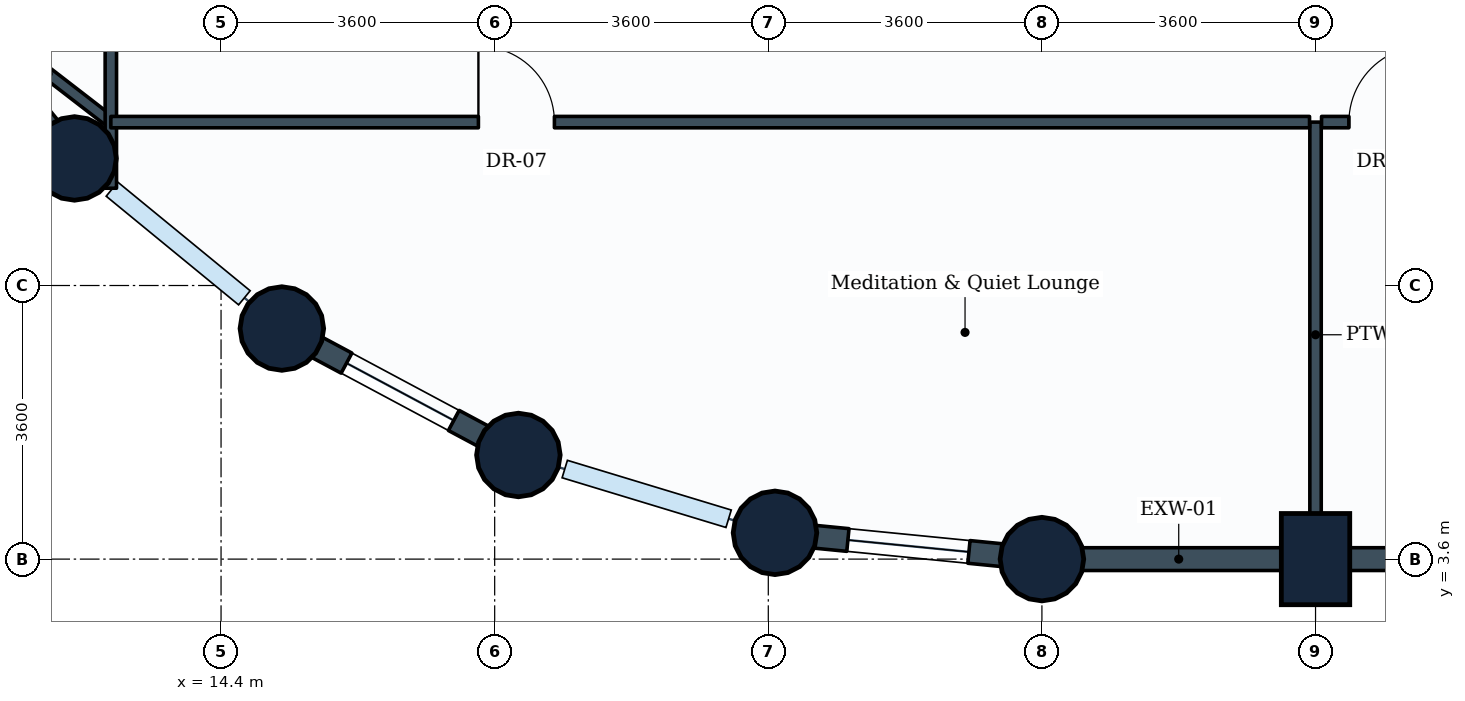
"""IFC4 building model, lengths in metres.
Left out: names, types, materials, properties, quantities, classifications, styles, units other than length and angle.
Written with IfcOpenShell. Run it as: python <this file> out.ifc"""

import sys

from ifc_helpers import new_model, si_unit, direction, frame, frame_2d, origin, origin_2d, place, context, subcontext, project, spatial, rectangle, circle, extrude, element, fill, save


model = new_model("IFC4")
c1 = context("Model", 3, precision=1e-05, world=origin(), true_north=direction((0.0, 1.0)))
c2 = subcontext(c1, "Body", "Model", "MODEL_VIEW")
j1 = project(units=[si_unit("LENGTHUNIT", "METRE"), si_unit("PLANEANGLEUNIT", "RADIAN")], contexts=[c1])
p1 = place(None, origin())
s1 = spatial("IfcSite", under=j1, at=p1, CompositionType="ELEMENT")
p2 = place(p1, origin())
s2 = spatial("IfcBuilding", under=s1, at=p2, CompositionType="ELEMENT")
p3 = place(p2, frame((0.0, 0.0, 51.3)))
s3 = spatial("IfcBuildingStorey", under=s2, at=p3, CompositionType="ELEMENT", Elevation=51.3)
for number, where, z_axis, x_axis in (
    (1, (12.472, 8.872, 0.0), (0.0, 0.0, 1.0), (1.0, 0.0, 0.0)),
    (2, (15.2, 6.634, 0.0), (0.0, 0.0, 1.0), (1.0, 0.0, 0.0)),
    (3, (18.312, 4.97, 0.0), (0.0, 0.0, 1.0), (1.0, 0.0, 0.0)),
    (4, (21.688, 3.946, 0.0), (0.0, 0.0, 1.0), (1.0, 0.0, 0.0)),
    (5, (25.2, 3.6, 0.0), (0.0, 0.0, 1.0), (1.0, 0.0, 0.0)),
):
    element("IfcColumn", number, at=place(p3, frame(where, z_axis=z_axis, x_axis=x_axis)), inside=s3, PredefinedType="COLUMN", context=c2, shape_type="SweptSolid", body=[
        extrude(circle(Radius=0.55, at=origin_2d()), origin(), (0.0, 0.0, 1.0), 3.9),
    ])
p4 = place(p3, frame((28.8, 3.6, 0.0), z_axis=(0.0, 0.0, 1.0), x_axis=(1.0, 0.0, 0.0)))
e6 = element("IfcColumn", 6, at=p4, inside=s3, PredefinedType="COLUMN", context=c2, shape_type="SweptSolid", body=[
    extrude(rectangle(XDim=0.9, YDim=1.2, at=origin_2d()), origin(), (0.0, 0.0, 1.0), 3.9),
])
p5 = place(p3, frame((28.8, 3.6, 0.0), z_axis=(0.0, 0.0, 1.0), x_axis=(-1.0, 0.0, 0.0)))
e7 = element("IfcWall", 7, at=p5, inside=s3, PredefinedType="STANDARD", context=c2, shape_type="SweptSolid", body=[
    extrude(rectangle(XDim=3.6, YDim=0.3, at=frame_2d((1.8, 0.0))), origin(), (0.0, 0.0, 1.0), 2.93),
])
p6 = place(p3, frame((32.4, 3.6, 0.0), z_axis=(0.0, 0.0, 1.0), x_axis=(-1.0, 0.0, 0.0)))
e8 = element("IfcWall", 8, at=p6, inside=s3, PredefinedType="STANDARD", context=c2, shape_type="SweptSolid", body=[
    extrude(rectangle(XDim=3.6, YDim=0.3, at=frame_2d((1.8, 0.0))), origin(), (0.0, 0.0, 1.0), 2.93),
])
p7 = place(p3, frame((12.472, 8.872, 0.0), z_axis=(0.0, 0.0, 1.0), x_axis=(-0.634258295121, 0.773121216285, 0.0)))
e9 = element("IfcWall", 9, at=p7, inside=s3, PredefinedType="STANDARD", context=c2, shape_type="SweptSolid", body=[
    extrude(rectangle(XDim=3.529, YDim=0.3, at=frame_2d((1.764, 0.0))), origin(), (0.0, 0.0, 1.0), 2.93),
])
p8 = place(p3, frame((18.312, 4.97, 0.0), z_axis=(0.0, 0.0, 1.0), x_axis=(-0.881846862014, 0.471535907389, 0.0)))
e10 = element("IfcWall", 10, at=p8, inside=s3, PredefinedType="STANDARD", context=c2, shape_type="SweptSolid", body=[
    extrude(rectangle(XDim=3.529, YDim=0.3, at=frame_2d((1.765, 0.0))), origin(), (0.0, 0.0, 1.0), 2.93),
])
p9 = place(p8, frame((0.964, 0.0, 0.85)))
e11 = element("IfcOpeningElement", 11, at=p9, cuts=e10, PredefinedType="OPENING", context=c2, shape_type="SweptSolid", body=[
    extrude(rectangle(XDim=1.6, YDim=1.35, at=frame_2d((0.8, 0.675))), frame((0.0, 0.16, 0.0), z_axis=(0.0, -1.0, 0.0), x_axis=(1.0, 0.0, 0.0)), (0.0, 0.0, 1.0), 0.32),
])
p10 = place(p3, frame((25.2, 3.6, 0.0), z_axis=(0.0, 0.0, 1.0), x_axis=(-0.995183369056, 0.098030923459, 0.0)))
e12 = element("IfcWall", 12, at=p10, inside=s3, PredefinedType="STANDARD", context=c2, shape_type="SweptSolid", body=[
    extrude(rectangle(XDim=3.529, YDim=0.3, at=frame_2d((1.765, 0.0))), origin(), (0.0, 0.0, 1.0), 2.93),
])
p11 = place(p10, frame((0.965, 0.0, 0.85)))
e13 = element("IfcOpeningElement", 13, at=p11, cuts=e12, PredefinedType="OPENING", context=c2, shape_type="SweptSolid", body=[
    extrude(rectangle(XDim=1.6, YDim=1.35, at=frame_2d((0.8, 0.675))), frame((0.0, 0.16, 0.0), z_axis=(0.0, -1.0, 0.0), x_axis=(1.0, 0.0, 0.0)), (0.0, 0.0, 1.0), 0.32),
])
p12 = place(p3, frame((28.8, 9.35, 0.0), z_axis=(0.0, 0.0, 1.0), x_axis=(0.0, -1.0, 0.0)))
e14 = element("IfcWall", 14, at=p12, inside=s3, PredefinedType="PARTITIONING", context=c2, shape_type="SweptSolid", body=[
    extrude(rectangle(XDim=5.596, YDim=0.15, at=frame_2d((2.798, 0.0))), origin(), (0.0, 0.0, 1.0), 3.635),
])
p13 = place(p3, frame((12.95, 9.35, 0.0), z_axis=(0.0, 0.0, 1.0), x_axis=(-0.791573423038, 0.611074067474, 0.0)))
e15 = element("IfcWall", 15, at=p13, inside=s3, PredefinedType="PARTITIONING", context=c2, shape_type="SweptSolid", body=[
    extrude(rectangle(XDim=2.084, YDim=0.15, at=frame_2d((1.042, 0.0))), origin(), (0.0, 0.0, 1.0), 2.93),
])
p14 = place(p3, frame((12.95, 8.48, 0.0), z_axis=(0.0, 0.0, 1.0), x_axis=(0.0, 1.0, 0.0)))
e16 = element("IfcWall", 16, at=p14, inside=s3, PredefinedType="PARTITIONING", context=c2, shape_type="SweptSolid", body=[
    extrude(rectangle(XDim=8.041, YDim=0.15, at=frame_2d((4.021, 0.0))), origin(), (0.0, 0.0, 1.0), 2.93),
])
p15 = place(p14, frame((5.101, 0.0, 0.0)))
e17 = element("IfcOpeningElement", 17, at=p15, cuts=e16, PredefinedType="OPENING", context=c2, shape_type="SweptSolid", body=[
    extrude(rectangle(XDim=1.0, YDim=2.1, at=frame_2d((0.5, 1.05))), frame((0.0, 0.085, 0.0), z_axis=(0.0, -1.0, 0.0), x_axis=(1.0, 0.0, 0.0)), (0.0, 0.0, 1.0), 0.17),
])
p16 = place(p3, frame((12.95, 9.35, 0.0), z_axis=(0.0, 0.0, 1.0), x_axis=(1.0, 0.0, 0.0)))
e18 = element("IfcWall", 18, at=p16, inside=s3, PredefinedType="PARTITIONING", context=c2, shape_type="SweptSolid", body=[
    extrude(rectangle(XDim=15.771, YDim=0.15, at=frame_2d((7.885, 0.0))), origin(), (0.0, 0.0, 1.0), 3.04),
])
p17 = place(p16, frame((4.836, 0.0, 0.0)))
e19 = element("IfcOpeningElement", 19, at=p17, cuts=e18, PredefinedType="OPENING", context=c2, shape_type="SweptSolid", body=[
    extrude(rectangle(XDim=1.0, YDim=2.1, at=frame_2d((0.5, 1.05))), frame((0.0, 0.085, 0.0), z_axis=(0.0, -1.0, 0.0), x_axis=(1.0, 0.0, 0.0)), (0.0, 0.0, 1.0), 0.17),
])
p18 = place(p3, frame((28.879, 9.35, 0.0), z_axis=(0.0, 0.0, 1.0), x_axis=(1.0, 0.0, 0.0)))
e20 = element("IfcWall", 20, at=p18, inside=s3, PredefinedType="PARTITIONING", context=c2, shape_type="SweptSolid", body=[
    extrude(rectangle(XDim=5.521, YDim=0.15, at=frame_2d((2.76, 0.0))), origin(), (0.0, 0.0, 1.0), 3.635),
])
p19 = place(p18, frame((0.36, 0.0, 0.0)))
e21 = element("IfcOpeningElement", 21, at=p19, cuts=e20, PredefinedType="OPENING", context=c2, shape_type="SweptSolid", body=[
    extrude(rectangle(XDim=1.0, YDim=2.1, at=frame_2d((0.5, 1.05))), frame((0.0, 0.085, 0.0), z_axis=(0.0, -1.0, 0.0), x_axis=(1.0, 0.0, 0.0)), (0.0, 0.0, 1.0), 0.17),
])
p20 = place(p9, origin())
e22 = element("IfcWindow", 22, at=p20, inside=s3, PartitioningType="SINGLE_PANEL", PredefinedType="WINDOW", context=c2, shape_type="SweptSolid", body=[
    extrude(rectangle(XDim=1.6, YDim=1.35, at=frame_2d((0.8, 0.675))), frame((0.0, 0.03, 0.0), z_axis=(0.0, -1.0, 0.0), x_axis=(1.0, 0.0, 0.0)), (0.0, 0.0, 1.0), 0.06),
])
fill(e11, e22)
p21 = place(p11, origin())
e23 = element("IfcWindow", 23, at=p21, inside=s3, PartitioningType="SINGLE_PANEL", PredefinedType="WINDOW", context=c2, shape_type="SweptSolid", body=[
    extrude(rectangle(XDim=1.6, YDim=1.35, at=frame_2d((0.8, 0.675))), frame((0.0, 0.03, 0.0), z_axis=(0.0, -1.0, 0.0), x_axis=(1.0, 0.0, 0.0)), (0.0, 0.0, 1.0), 0.06),
])
fill(e13, e23)
p22 = place(p17, origin())
e24 = element("IfcDoor", 24, at=p22, inside=s3, OperationType="SINGLE_SWING_LEFT", PredefinedType="DOOR", context=c2, shape_type="SweptSolid", body=[
    extrude(rectangle(XDim=1.0, YDim=2.1, at=frame_2d((0.5, 1.05))), frame((0.0, 0.025, 0.0), z_axis=(0.0, -1.0, 0.0), x_axis=(1.0, 0.0, 0.0)), (0.0, 0.0, 1.0), 0.05),
])
fill(e19, e24)
p23 = place(p19, origin())
e25 = element("IfcDoor", 25, at=p23, inside=s3, OperationType="SINGLE_SWING_RIGHT", PredefinedType="DOOR", context=c2, shape_type="SweptSolid", body=[
    extrude(rectangle(XDim=1.0, YDim=2.1, at=frame_2d((0.5, 1.05))), frame((0.0, 0.025, 0.0), z_axis=(0.0, -1.0, 0.0), x_axis=(1.0, 0.0, 0.0)), (0.0, 0.0, 1.0), 0.05),
])
fill(e21, e25)
save(model, sys.argv[1])
